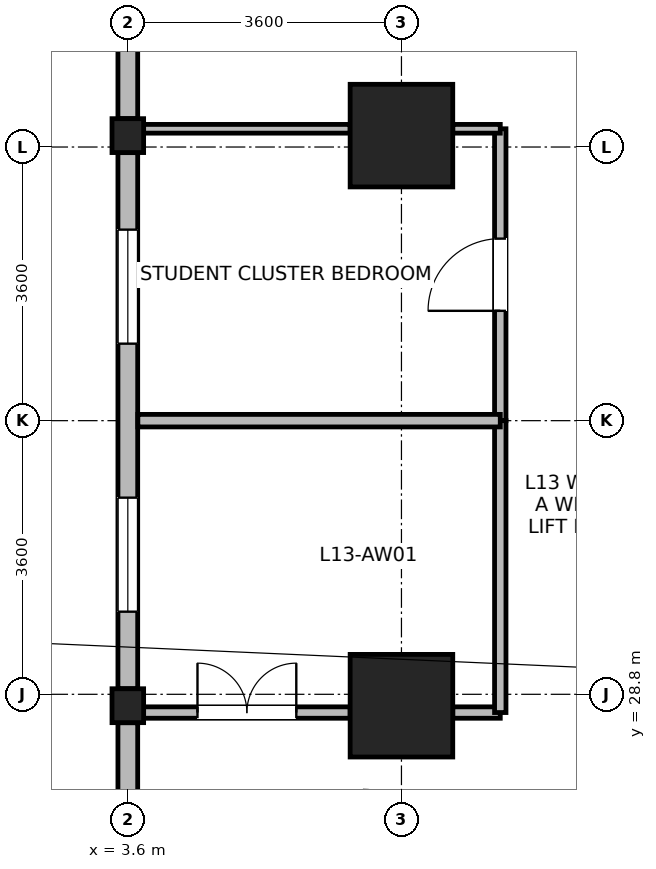
"""IFC4 building model, lengths in metres.
Left out: names, types, materials, properties, quantities, classifications, styles, units other than length and angle.
Written with IfcOpenShell. Run it as: python <this file> out.ifc"""

import sys

from ifc_helpers import new_model, si_unit, direction, frame, frame_2d, origin, origin_2d, place, context, subcontext, project, spatial, rectangle, i_section, extrude, source, transform, mapped, element, fill, save


model = new_model("IFC4")
c1 = context("Model", 3, precision=1e-05, world=origin(), true_north=direction((0.0, 1.0)))
c2 = subcontext(c1, "Body", "Model", "MODEL_VIEW")
j1 = project(units=[si_unit("LENGTHUNIT", "METRE"), si_unit("PLANEANGLEUNIT", "RADIAN")], contexts=[c1])
p1 = place(None, origin())
s1 = spatial("IfcSite", under=j1, at=p1, CompositionType="ELEMENT")
p2 = place(p1, origin())
s2 = spatial("IfcBuilding", under=s1, at=p2, CompositionType="ELEMENT")
p3 = place(p2, frame((0.0, 0.0, 54.9)))
s3 = spatial("IfcBuildingStorey", under=s2, at=p3, CompositionType="ELEMENT", Elevation=54.9)
m1 = source(origin(), c2, "Body", "SweptSolid", [
    extrude(rectangle(XDim=1.35, YDim=1.35, at=origin_2d()), origin(), (0.0, 0.0, 1.0), 3.7),
])
for number, where, z_axis, x_axis in (
    (1, (7.2, 28.65, 0.0), (0.0, 0.0, 1.0), (1.0, 0.0, 0.0)),
    (2, (7.2, 36.15, 0.0), (0.0, 0.0, 1.0), (1.0, 0.0, 0.0)),
):
    element("IfcColumn", number, at=place(p3, frame(where, z_axis=z_axis, x_axis=x_axis)), inside=s3, PredefinedType="COLUMN", context=c2, shape_type="MappedRepresentation", body=[
        mapped(m1, transform((0.0, 0.0, 0.0), x_axis=(1.0, 0.0, 0.0), y_axis=(0.0, 1.0, 0.0), z_axis=(0.0, 0.0, 1.0), scale=1.0)),
    ])
m2 = source(origin(), c2, "Body", "SweptSolid", [
    extrude(i_section(OverallWidth=0.416, OverallDepth=0.446, WebThickness=0.029, FlangeThickness=0.04, FilletRadius=0.015, at=origin_2d()), origin(), (0.0, 0.0, 1.0), 3.7),
])
for number, where, z_axis, x_axis in (
    (3, (3.6, 28.65, 0.0), (0.0, 0.0, 1.0), (1.0, 0.0, 0.0)),
    (4, (3.6, 36.15, 0.0), (0.0, 0.0, 1.0), (1.0, 0.0, 0.0)),
):
    element("IfcColumn", number, at=place(p3, frame(where, z_axis=z_axis, x_axis=x_axis)), inside=s3, PredefinedType="COLUMN", context=c2, shape_type="MappedRepresentation", body=[
        mapped(m2, transform((0.0, 0.0, 0.0), x_axis=(1.0, 0.0, 0.0), y_axis=(0.0, 1.0, 0.0), z_axis=(0.0, 0.0, 1.0), scale=1.0)),
    ])
p4 = place(p3, frame((3.6, 36.374, 0.0), z_axis=(0.0, 0.0, 1.0), x_axis=(0.0, 1.0, 0.0)))
e5 = element("IfcWall", 5, at=p4, inside=s3, PredefinedType="STANDARD", context=c2, shape_type="SweptSolid", body=[
    extrude(rectangle(XDim=3.356, YDim=0.26, at=frame_2d((1.678, 0.0))), origin(), (0.0, 0.0, 1.0), 3.43),
])
p5 = place(p4, frame((0.928, 0.0, 0.85)))
e6 = element("IfcOpeningElement", 6, at=p5, cuts=e5, PredefinedType="OPENING", context=c2, shape_type="SweptSolid", body=[
    extrude(rectangle(XDim=1.5, YDim=1.85, at=frame_2d((0.75, 0.925))), frame((0.0, 0.14, 0.0), z_axis=(0.0, -1.0, 0.0), x_axis=(1.0, 0.0, 0.0)), (0.0, 0.0, 1.0), 0.28),
])
p6 = place(p3, frame((3.6, 28.874, 0.0), z_axis=(0.0, 0.0, 1.0), x_axis=(0.0, 1.0, 0.0)))
e7 = element("IfcWall", 7, at=p6, inside=s3, PredefinedType="STANDARD", context=c2, shape_type="SweptSolid", body=[
    extrude(rectangle(XDim=7.052, YDim=0.26, at=frame_2d((3.526, 0.0))), origin(), (0.0, 0.0, 1.0), 2.93),
])
p7 = place(p6, frame((1.013, 0.0, 0.85)))
e8 = element("IfcOpeningElement", 8, at=p7, cuts=e7, PredefinedType="OPENING", context=c2, shape_type="SweptSolid", body=[
    extrude(rectangle(XDim=1.5, YDim=1.85, at=frame_2d((0.75, 0.925))), frame((0.0, 0.14, 0.0), z_axis=(0.0, -1.0, 0.0), x_axis=(1.0, 0.0, 0.0)), (0.0, 0.0, 1.0), 0.28),
])
p8 = place(p6, frame((4.539, 0.0, 0.85)))
e9 = element("IfcOpeningElement", 9, at=p8, cuts=e7, PredefinedType="OPENING", context=c2, shape_type="SweptSolid", body=[
    extrude(rectangle(XDim=1.5, YDim=1.85, at=frame_2d((0.75, 0.925))), frame((0.0, 0.14, 0.0), z_axis=(0.0, -1.0, 0.0), x_axis=(1.0, 0.0, 0.0)), (0.0, 0.0, 1.0), 0.28),
])
p9 = place(p3, frame((3.6, 21.47, 0.0), z_axis=(0.0, 0.0, 1.0), x_axis=(0.0, 1.0, 0.0)))
e10 = element("IfcWall", 10, at=p9, inside=s3, PredefinedType="STANDARD", context=c2, shape_type="SweptSolid", body=[
    extrude(rectangle(XDim=6.956, YDim=0.26, at=frame_2d((3.478, 0.0))), origin(), (0.0, 0.0, 1.0), 3.43),
])
p10 = place(p9, frame((0.989, 0.0, 0.85)))
e11 = element("IfcOpeningElement", 11, at=p10, cuts=e10, PredefinedType="OPENING", context=c2, shape_type="SweptSolid", body=[
    extrude(rectangle(XDim=1.5, YDim=1.85, at=frame_2d((0.75, 0.925))), frame((0.0, 0.14, 0.0), z_axis=(0.0, -1.0, 0.0), x_axis=(1.0, 0.0, 0.0)), (0.0, 0.0, 1.0), 0.28),
])
p11 = place(p9, frame((3.003, 0.0, 0.85)))
e12 = element("IfcOpeningElement", 12, at=p11, cuts=e10, PredefinedType="OPENING", context=c2, shape_type="SweptSolid", body=[
    extrude(rectangle(XDim=0.95, YDim=1.75, at=frame_2d((0.475, 0.875))), frame((0.0, 0.14, 0.0), z_axis=(0.0, -1.0, 0.0), x_axis=(1.0, 0.0, 0.0)), (0.0, 0.0, 1.0), 0.28),
])
p12 = place(p3, frame((3.808, 28.56, 0.0), z_axis=(0.0, 0.0, 1.0), x_axis=(1.0, 0.0, 0.0)))
e13 = element("IfcWall", 13, at=p12, inside=s3, PredefinedType="PARTITIONING", context=c2, shape_type="SweptSolid", body=[
    extrude(rectangle(XDim=2.717, YDim=0.15, at=frame_2d((1.358, 0.0))), origin(), (0.0, 0.0, 1.0), 2.78),
])
p13 = place(p12, frame((0.708, 0.0, 0.0)))
e14 = element("IfcOpeningElement", 14, at=p13, cuts=e13, PredefinedType="OPENING", context=c2, shape_type="SweptSolid", body=[
    extrude(rectangle(XDim=1.3, YDim=2.12, at=frame_2d((0.65, 1.06))), frame((0.0, 0.085, 0.0), z_axis=(0.0, -1.0, 0.0), x_axis=(1.0, 0.0, 0.0)), (0.0, 0.0, 1.0), 0.17),
])
p14 = place(p3, frame((7.875, 28.56, 0.0), z_axis=(0.0, 0.0, 1.0), x_axis=(1.0, 0.0, 0.0)))
e15 = element("IfcWall", 15, at=p14, inside=s3, PredefinedType="PARTITIONING", context=c2, shape_type="SweptSolid", body=[
    extrude(rectangle(XDim=0.625, YDim=0.15, at=frame_2d((0.312, 0.0))), origin(), (0.0, 0.0, 1.0), 2.78),
])
p15 = place(p3, frame((8.5, 32.4, 0.0), z_axis=(0.0, 0.0, 1.0), x_axis=(0.0, 1.0, 0.0)))
e16 = element("IfcWall", 16, at=p15, inside=s3, PredefinedType="PARTITIONING", context=c2, shape_type="SweptSolid", body=[
    extrude(rectangle(XDim=3.84, YDim=0.15, at=frame_2d((1.92, 0.0))), origin(), (0.0, 0.0, 1.0), 3.43),
])
p16 = place(p15, frame((1.445, 0.0, 0.0)))
e17 = element("IfcOpeningElement", 17, at=p16, cuts=e16, PredefinedType="OPENING", context=c2, shape_type="SweptSolid", body=[
    extrude(rectangle(XDim=0.95, YDim=2.1, at=frame_2d((0.475, 1.05))), frame((0.0, 0.085, 0.0), z_axis=(0.0, -1.0, 0.0), x_axis=(1.0, 0.0, 0.0)), (0.0, 0.0, 1.0), 0.17),
])
p17 = place(p3, frame((8.5, 28.56, 0.0), z_axis=(0.0, 0.0, 1.0), x_axis=(0.0, 1.0, 0.0)))
e18 = element("IfcWall", 18, at=p17, inside=s3, PredefinedType="PARTITIONING", context=c2, shape_type="SweptSolid", body=[
    extrude(rectangle(XDim=3.84, YDim=0.15, at=frame_2d((1.92, 0.0))), origin(), (0.0, 0.0, 1.0), 3.43),
])
p18 = place(p3, frame((3.732, 32.4, 0.0), z_axis=(0.0, 0.0, 1.0), x_axis=(1.0, 0.0, 0.0)))
e19 = element("IfcWall", 19, at=p18, inside=s3, PredefinedType="PARTITIONING", context=c2, shape_type="SweptSolid", body=[
    extrude(rectangle(XDim=4.768, YDim=0.165, at=frame_2d((2.384, 0.0))), origin(), (0.0, 0.0, 1.0), 3.43),
])
p19 = place(p3, frame((3.808, 36.24, 0.0), z_axis=(0.0, 0.0, 1.0), x_axis=(1.0, 0.0, 0.0)))
e20 = element("IfcWall", 20, at=p19, inside=s3, PredefinedType="PARTITIONING", context=c2, shape_type="SweptSolid", body=[
    extrude(rectangle(XDim=2.717, YDim=0.115, at=frame_2d((1.358, 0.0))), origin(), (0.0, 0.0, 1.0), 2.78),
])
p20 = place(p3, frame((7.875, 36.24, 0.0), z_axis=(0.0, 0.0, 1.0), x_axis=(1.0, 0.0, 0.0)))
e21 = element("IfcWall", 21, at=p20, inside=s3, PredefinedType="PARTITIONING", context=c2, shape_type="SweptSolid", body=[
    extrude(rectangle(XDim=0.625, YDim=0.115, at=frame_2d((0.312, 0.0))), origin(), (0.0, 0.0, 1.0), 2.78),
])
p21 = place(p7, origin())
e22 = element("IfcWindow", 22, at=p21, inside=s3, PartitioningType="SINGLE_PANEL", PredefinedType="WINDOW", context=c2, shape_type="SweptSolid", body=[
    extrude(rectangle(XDim=1.5, YDim=1.85, at=frame_2d((0.75, 0.925))), frame((0.0, 0.03, 0.0), z_axis=(0.0, -1.0, 0.0), x_axis=(1.0, 0.0, 0.0)), (0.0, 0.0, 1.0), 0.06),
])
fill(e8, e22)
p22 = place(p8, origin())
e23 = element("IfcWindow", 23, at=p22, inside=s3, PartitioningType="SINGLE_PANEL", PredefinedType="WINDOW", context=c2, shape_type="SweptSolid", body=[
    extrude(rectangle(XDim=1.5, YDim=1.85, at=frame_2d((0.75, 0.925))), frame((0.0, 0.03, 0.0), z_axis=(0.0, -1.0, 0.0), x_axis=(1.0, 0.0, 0.0)), (0.0, 0.0, 1.0), 0.06),
])
fill(e9, e23)
p23 = place(p13, origin())
e24 = element("IfcDoor", 24, at=p23, inside=s3, OperationType="DOUBLE_DOOR_SINGLE_SWING", PredefinedType="DOOR", context=c2, shape_type="SweptSolid", body=[
    extrude(rectangle(XDim=1.3, YDim=2.12, at=frame_2d((0.65, 1.06))), frame((0.0, 0.025, 0.0), z_axis=(0.0, -1.0, 0.0), x_axis=(1.0, 0.0, 0.0)), (0.0, 0.0, 1.0), 0.05),
])
fill(e14, e24)
p24 = place(p16, origin())
e25 = element("IfcDoor", 25, at=p24, inside=s3, OperationType="SINGLE_SWING_LEFT", PredefinedType="DOOR", context=c2, shape_type="SweptSolid", body=[
    extrude(rectangle(XDim=0.95, YDim=2.1, at=frame_2d((0.475, 1.05))), frame((0.0, 0.025, 0.0), z_axis=(0.0, -1.0, 0.0), x_axis=(1.0, 0.0, 0.0)), (0.0, 0.0, 1.0), 0.05),
])
fill(e17, e25)
save(model, sys.argv[1])
